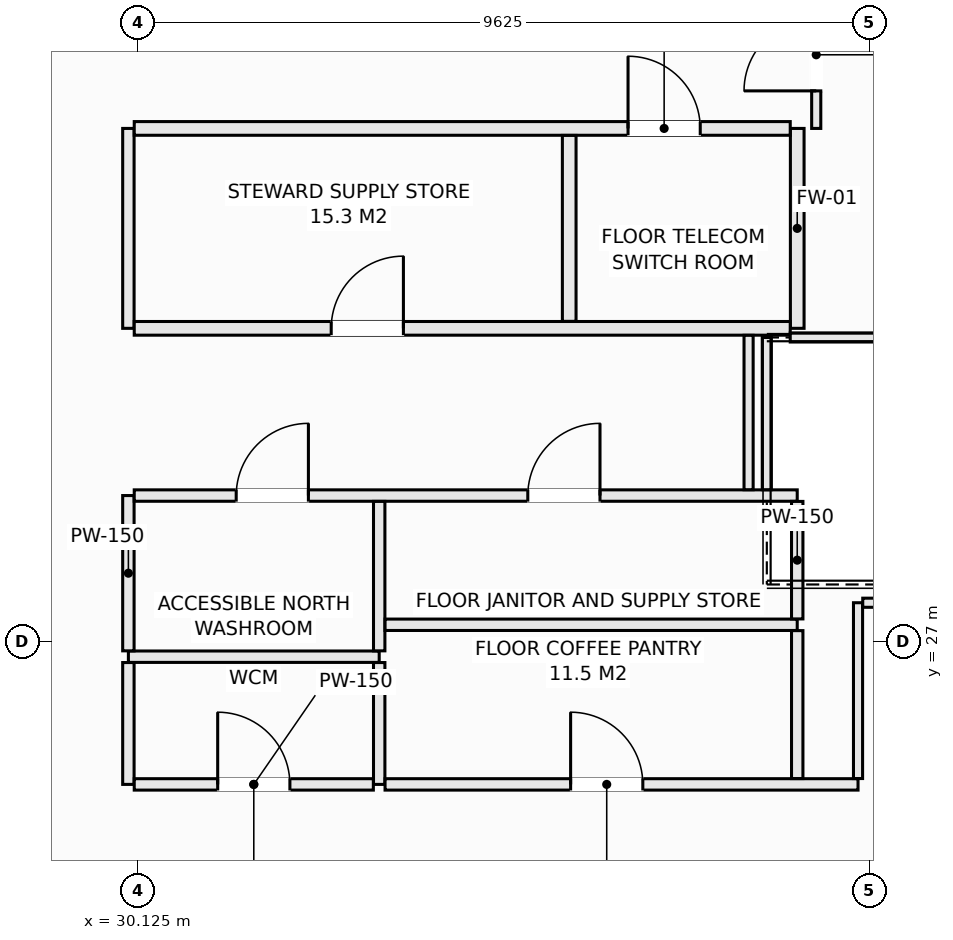
"""IFC4 building model, lengths in metres.
Left out: names, types, materials, properties, quantities, classifications, styles, units other than length and angle.
Written with IfcOpenShell. Run it as: python <this file> out.ifc"""

import sys

from ifc_helpers import new_model, si_unit, direction, frame, frame_2d, origin, place, context, subcontext, project, spatial, rectangle, extrude, element, fill, save


model = new_model("IFC4")
c1 = context("Model", 3, precision=1e-05, world=origin(), true_north=direction((0.0, 1.0)))
c2 = subcontext(c1, "Body", "Model", "MODEL_VIEW")
j1 = project(units=[si_unit("LENGTHUNIT", "METRE"), si_unit("PLANEANGLEUNIT", "RADIAN")], contexts=[c1])
p1 = place(None, origin())
s1 = spatial("IfcSite", under=j1, at=p1, CompositionType="ELEMENT")
p2 = place(p1, origin())
s2 = spatial("IfcBuilding", under=s1, at=p2, CompositionType="ELEMENT")
p3 = place(p2, frame((0.0, 0.0, 206.3)))
s3 = spatial("IfcBuildingStorey", under=s2, at=p3, CompositionType="ELEMENT", Elevation=206.3)
p4 = place(p3, frame((30.0, 26.8, 0.0), z_axis=(0.0, 0.0, 1.0), x_axis=(1.0, 0.0, 0.0)))
e1 = element("IfcWall", 1, at=p4, inside=s3, PredefinedType="PARTITIONING", context=c2, shape_type="SweptSolid", body=[
    extrude(rectangle(XDim=3.3, YDim=0.15, at=frame_2d((1.65, 0.0))), origin(), (0.0, 0.0, 1.0), 3.03),
])
p5 = place(p3, frame((30.0, 25.12, 0.0), z_axis=(0.0, 0.0, 1.0), x_axis=(0.0, 1.0, 0.0)))
e2 = element("IfcWall", 2, at=p5, inside=s3, PredefinedType="PARTITIONING", context=c2, shape_type="SweptSolid", body=[
    extrude(rectangle(XDim=1.603, YDim=0.15, at=frame_2d((0.801, 0.0))), origin(), (0.0, 0.0, 1.0), 3.03),
])
p6 = place(p3, frame((30.0, 26.877, 0.0), z_axis=(0.0, 0.0, 1.0), x_axis=(0.0, 1.0, 0.0)))
e3 = element("IfcWall", 3, at=p6, inside=s3, PredefinedType="PARTITIONING", context=c2, shape_type="SweptSolid", body=[
    extrude(rectangle(XDim=2.043, YDim=0.15, at=frame_2d((1.021, 0.0))), origin(), (0.0, 0.0, 1.0), 3.03),
])
p7 = place(p3, frame((30.0, 31.12, 0.0), z_axis=(0.0, 0.0, 1.0), x_axis=(0.0, 1.0, 0.0)))
e4 = element("IfcWall", 4, at=p7, inside=s3, PredefinedType="PARTITIONING", context=c2, shape_type="SweptSolid", body=[
    extrude(rectangle(XDim=2.63, YDim=0.15, at=frame_2d((1.315, 0.0))), origin(), (0.0, 0.0, 1.0), 3.03),
])
p8 = place(p3, frame((30.077, 28.92, 0.0), z_axis=(0.0, 0.0, 1.0), x_axis=(1.0, 0.0, 0.0)))
e5 = element("IfcWall", 5, at=p8, inside=s3, PredefinedType="PARTITIONING", context=c2, shape_type="SweptSolid", body=[
    extrude(rectangle(XDim=8.723, YDim=0.15, at=frame_2d((4.362, 0.0))), origin(), (0.0, 0.0, 1.0), 3.03),
])
p9 = place(p8, frame((1.342, 0.0, 0.0)))
e6 = element("IfcOpeningElement", 6, at=p9, cuts=e5, PredefinedType="OPENING", context=c2, shape_type="SweptSolid", body=[
    extrude(rectangle(XDim=0.95, YDim=2.1, at=frame_2d((0.475, 1.05))), frame((0.0, 0.085, 0.0), z_axis=(0.0, -1.0, 0.0), x_axis=(1.0, 0.0, 0.0)), (0.0, 0.0, 1.0), 0.17),
])
p10 = place(p8, frame((5.178, 0.0, 0.0)))
e7 = element("IfcOpeningElement", 7, at=p10, cuts=e5, PredefinedType="OPENING", context=c2, shape_type="SweptSolid", body=[
    extrude(rectangle(XDim=0.95, YDim=2.1, at=frame_2d((0.475, 1.05))), frame((0.0, 0.085, 0.0), z_axis=(0.0, -1.0, 0.0), x_axis=(1.0, 0.0, 0.0)), (0.0, 0.0, 1.0), 0.17),
])
p11 = place(p3, frame((33.3, 25.12, 0.0), z_axis=(0.0, 0.0, 1.0), x_axis=(0.0, 1.0, 0.0)))
e8 = element("IfcWall", 8, at=p11, inside=s3, PredefinedType="PARTITIONING", context=c2, shape_type="SweptSolid", body=[
    extrude(rectangle(XDim=1.603, YDim=0.15, at=frame_2d((0.801, 0.0))), origin(), (0.0, 0.0, 1.0), 3.03),
])
p12 = place(p3, frame((33.3, 26.877, 0.0), z_axis=(0.0, 0.0, 1.0), x_axis=(0.0, 1.0, 0.0)))
e9 = element("IfcWall", 9, at=p12, inside=s3, PredefinedType="PARTITIONING", context=c2, shape_type="SweptSolid", body=[
    extrude(rectangle(XDim=1.966, YDim=0.15, at=frame_2d((0.983, 0.0))), origin(), (0.0, 0.0, 1.0), 3.03),
])
p13 = place(p3, frame((30.077, 25.12, 0.0), z_axis=(0.0, 0.0, 1.0), x_axis=(1.0, 0.0, 0.0)))
e10 = element("IfcWall", 10, at=p13, inside=s3, PredefinedType="PARTITIONING", context=c2, shape_type="SweptSolid", body=[
    extrude(rectangle(XDim=3.146, YDim=0.15, at=frame_2d((1.573, 0.0))), origin(), (0.0, 0.0, 1.0), 3.03),
])
p14 = place(p13, frame((1.098, 0.0, 0.0)))
e11 = element("IfcOpeningElement", 11, at=p14, cuts=e10, PredefinedType="OPENING", context=c2, shape_type="SweptSolid", body=[
    extrude(rectangle(XDim=0.95, YDim=2.1, at=frame_2d((0.475, 1.05))), frame((0.0, 0.085, 0.0), z_axis=(0.0, -1.0, 0.0), x_axis=(1.0, 0.0, 0.0)), (0.0, 0.0, 1.0), 0.17),
])
p15 = place(p3, frame((33.377, 25.12, 0.0), z_axis=(0.0, 0.0, 1.0), x_axis=(1.0, 0.0, 0.0)))
e12 = element("IfcWall", 12, at=p15, inside=s3, PredefinedType="PARTITIONING", context=c2, shape_type="SweptSolid", body=[
    extrude(rectangle(XDim=6.223, YDim=0.15, at=frame_2d((3.112, 0.0))), origin(), (0.0, 0.0, 1.0), 3.03),
])
p16 = place(p15, frame((2.441, 0.0, 0.0)))
e13 = element("IfcOpeningElement", 13, at=p16, cuts=e12, PredefinedType="OPENING", context=c2, shape_type="SweptSolid", body=[
    extrude(rectangle(XDim=0.95, YDim=2.1, at=frame_2d((0.475, 1.05))), frame((0.0, 0.085, 0.0), z_axis=(0.0, -1.0, 0.0), x_axis=(1.0, 0.0, 0.0)), (0.0, 0.0, 1.0), 0.17),
])
p17 = place(p3, frame((33.377, 27.22, 0.0), z_axis=(0.0, 0.0, 1.0), x_axis=(1.0, 0.0, 0.0)))
e14 = element("IfcWall", 14, at=p17, inside=s3, PredefinedType="PARTITIONING", context=c2, shape_type="SweptSolid", body=[
    extrude(rectangle(XDim=5.423, YDim=0.15, at=frame_2d((2.711, 0.0))), origin(), (0.0, 0.0, 1.0), 3.03),
])
p18 = place(p3, frame((38.8, 25.197, 0.0), z_axis=(0.0, 0.0, 1.0), x_axis=(0.0, 1.0, 0.0)))
e15 = element("IfcWall", 15, at=p18, inside=s3, PredefinedType="PARTITIONING", context=c2, shape_type="SweptSolid", body=[
    extrude(rectangle(XDim=1.946, YDim=0.15, at=frame_2d((0.973, 0.0))), origin(), (0.0, 0.0, 1.0), 3.03),
])
p19 = place(p3, frame((38.8, 27.297, 0.0), z_axis=(0.0, 0.0, 1.0), x_axis=(0.0, 1.0, 0.0)))
e16 = element("IfcWall", 16, at=p19, inside=s3, PredefinedType="PARTITIONING", context=c2, shape_type="SweptSolid", body=[
    extrude(rectangle(XDim=1.546, YDim=0.15, at=frame_2d((0.773, 0.0))), origin(), (0.0, 0.0, 1.0), 3.03),
])
p20 = place(p3, frame((38.8, 31.12, 0.0), z_axis=(0.0, 0.0, 1.0), x_axis=(0.0, 1.0, 0.0)))
e17 = element("IfcWall", 17, at=p20, inside=s3, PredefinedType="SOLIDWALL", context=c2, shape_type="SweptSolid", body=[
    extrude(rectangle(XDim=2.63, YDim=0.18, at=frame_2d((1.315, 0.0))), origin(), (0.0, 0.0, 1.0), 3.03),
])
p21 = place(p3, frame((30.077, 31.12, 0.0), z_axis=(0.0, 0.0, 1.0), x_axis=(1.0, 0.0, 0.0)))
e18 = element("IfcWall", 18, at=p21, inside=s3, PredefinedType="SOLIDWALL", context=c2, shape_type="SweptSolid", body=[
    extrude(rectangle(XDim=8.631, YDim=0.18, at=frame_2d((4.315, 0.0))), origin(), (0.0, 0.0, 1.0), 3.03),
])
p22 = place(p21, frame((2.592, 0.0, 0.0)))
e19 = element("IfcOpeningElement", 19, at=p22, cuts=e18, PredefinedType="OPENING", context=c2, shape_type="SweptSolid", body=[
    extrude(rectangle(XDim=0.95, YDim=2.1, at=frame_2d((0.475, 1.05))), frame((0.0, 0.1, 0.0), z_axis=(0.0, -1.0, 0.0), x_axis=(1.0, 0.0, 0.0)), (0.0, 0.0, 1.0), 0.2),
])
p23 = place(p3, frame((30.077, 33.75, 0.0), z_axis=(0.0, 0.0, 1.0), x_axis=(1.0, 0.0, 0.0)))
e20 = element("IfcWall", 20, at=p23, inside=s3, PredefinedType="SOLIDWALL", context=c2, shape_type="SweptSolid", body=[
    extrude(rectangle(XDim=8.631, YDim=0.18, at=frame_2d((4.315, 0.0))), origin(), (0.0, 0.0, 1.0), 3.03),
])
p24 = place(p23, frame((6.497, 0.0, 0.0)))
e21 = element("IfcOpeningElement", 21, at=p24, cuts=e20, PredefinedType="OPENING", context=c2, shape_type="SweptSolid", body=[
    extrude(rectangle(XDim=0.95, YDim=2.1, at=frame_2d((0.475, 1.05))), frame((0.0, 0.1, 0.0), z_axis=(0.0, -1.0, 0.0), x_axis=(1.0, 0.0, 0.0)), (0.0, 0.0, 1.0), 0.2),
])
p25 = place(p3, frame((35.8, 31.212, 0.0), z_axis=(0.0, 0.0, 1.0), x_axis=(0.0, 1.0, 0.0)))
e22 = element("IfcWall", 22, at=p25, inside=s3, PredefinedType="SOLIDWALL", context=c2, shape_type="SweptSolid", body=[
    extrude(rectangle(XDim=2.446, YDim=0.18, at=frame_2d((1.223, 0.0))), origin(), (0.0, 0.0, 1.0), 3.03),
])
p26 = place(p3, frame((39.05, 33.75, 0.0), z_axis=(0.0, 0.0, 1.0), x_axis=(0.0, 1.0, 0.0)))
e23 = element("IfcWall", 23, at=p26, inside=s3, PredefinedType="PARTITIONING", context=c2, shape_type="SweptSolid", body=[
    extrude(rectangle(XDim=1.938, YDim=0.12, at=frame_2d((0.969, 0.0))), origin(), (0.0, 0.0, 1.0), 3.03),
])
p27 = place(p26, frame((0.494, 0.0, 0.0)))
e24 = element("IfcOpeningElement", 24, at=p27, cuts=e23, PredefinedType="OPENING", context=c2, shape_type="SweptSolid", body=[
    extrude(rectangle(XDim=0.95, YDim=2.1, at=frame_2d((0.475, 1.05))), frame((0.0, 0.07, 0.0), z_axis=(0.0, -1.0, 0.0), x_axis=(1.0, 0.0, 0.0)), (0.0, 0.0, 1.0), 0.14),
])
p28 = place(p3, frame((38.16, 28.997, 0.0), z_axis=(0.0, 0.0, 1.0), x_axis=(0.0, 1.0, 0.0)))
e25 = element("IfcWall", 25, at=p28, inside=s3, PredefinedType="PARTITIONING", context=c2, shape_type="SweptSolid", body=[
    extrude(rectangle(XDim=2.031, YDim=0.12, at=frame_2d((1.016, 0.0))), origin(), (0.0, 0.0, 1.0), 3.03),
])
p29 = place(p3, frame((39.6, 25.197, 0.0), z_axis=(0.0, 0.0, 1.0), x_axis=(0.0, 1.0, 0.0)))
e26 = element("IfcWall", 26, at=p29, inside=s3, PredefinedType="PARTITIONING", context=c2, shape_type="SweptSolid", body=[
    extrude(rectangle(XDim=2.313, YDim=0.12, at=frame_2d((1.156, 0.0))), origin(), (0.0, 0.0, 1.0), 3.03),
])
p30 = place(p3, frame((39.662, 27.51, 0.0), z_axis=(0.0, 0.0, 1.0), x_axis=(1.0, 0.0, 0.0)))
e27 = element("IfcWall", 27, at=p30, inside=s3, PredefinedType="PARTITIONING", context=c2, shape_type="SweptSolid", body=[
    extrude(rectangle(XDim=1.858, YDim=0.12, at=frame_2d((0.929, 0.0))), origin(), (0.0, 0.0, 1.0), 3.03),
])
p31 = place(p3, frame((38.708, 31.0, 0.0), z_axis=(0.0, 0.0, 1.0), x_axis=(1.0, 0.0, 0.0)))
e28 = element("IfcWall", 28, at=p31, inside=s3, PredefinedType="PARTITIONING", context=c2, shape_type="SweptSolid", body=[
    extrude(rectangle(XDim=5.302, YDim=0.12, at=frame_2d((2.651, 0.0))), origin(), (0.0, 0.0, 1.0), 3.03),
])
p32 = place(p3, frame((38.4, 28.997, 0.0), z_axis=(0.0, 0.0, 1.0), x_axis=(0.0, 1.0, 0.0)))
e29 = element("IfcWall", 29, at=p32, inside=s3, PredefinedType="PARTITIONING", context=c2, shape_type="SweptSolid", body=[
    extrude(rectangle(XDim=2.003, YDim=0.12, at=frame_2d((1.001, 0.0))), origin(), (0.0, 0.0, 1.0), 3.03),
])
p33 = place(p9, origin())
e30 = element("IfcDoor", 30, at=p33, inside=s3, OperationType="SINGLE_SWING_RIGHT", PredefinedType="DOOR", context=c2, shape_type="SweptSolid", body=[
    extrude(rectangle(XDim=0.95, YDim=2.1, at=frame_2d((0.475, 1.05))), frame((0.0, 0.025, 0.0), z_axis=(0.0, -1.0, 0.0), x_axis=(1.0, 0.0, 0.0)), (0.0, 0.0, 1.0), 0.05),
])
fill(e6, e30)
p34 = place(p14, origin())
e31 = element("IfcDoor", 31, at=p34, inside=s3, OperationType="SINGLE_SWING_LEFT", PredefinedType="DOOR", context=c2, shape_type="SweptSolid", body=[
    extrude(rectangle(XDim=0.95, YDim=2.1, at=frame_2d((0.475, 1.05))), frame((0.0, 0.025, 0.0), z_axis=(0.0, -1.0, 0.0), x_axis=(1.0, 0.0, 0.0)), (0.0, 0.0, 1.0), 0.05),
])
fill(e11, e31)
p35 = place(p10, origin())
e32 = element("IfcDoor", 32, at=p35, inside=s3, OperationType="SINGLE_SWING_RIGHT", PredefinedType="DOOR", context=c2, shape_type="SweptSolid", body=[
    extrude(rectangle(XDim=0.95, YDim=2.1, at=frame_2d((0.475, 1.05))), frame((0.0, 0.025, 0.0), z_axis=(0.0, -1.0, 0.0), x_axis=(1.0, 0.0, 0.0)), (0.0, 0.0, 1.0), 0.05),
])
fill(e7, e32)
p36 = place(p16, origin())
e33 = element("IfcDoor", 33, at=p36, inside=s3, OperationType="SINGLE_SWING_LEFT", PredefinedType="DOOR", context=c2, shape_type="SweptSolid", body=[
    extrude(rectangle(XDim=0.95, YDim=2.1, at=frame_2d((0.475, 1.05))), frame((0.0, 0.025, 0.0), z_axis=(0.0, -1.0, 0.0), x_axis=(1.0, 0.0, 0.0)), (0.0, 0.0, 1.0), 0.05),
])
fill(e13, e33)
p37 = place(p22, origin())
e34 = element("IfcDoor", 34, at=p37, inside=s3, OperationType="SINGLE_SWING_RIGHT", PredefinedType="DOOR", context=c2, shape_type="SweptSolid", body=[
    extrude(rectangle(XDim=0.95, YDim=2.1, at=frame_2d((0.475, 1.05))), frame((0.0, 0.025, 0.0), z_axis=(0.0, -1.0, 0.0), x_axis=(1.0, 0.0, 0.0)), (0.0, 0.0, 1.0), 0.05),
])
fill(e19, e34)
p38 = place(p24, origin())
e35 = element("IfcDoor", 35, at=p38, inside=s3, OperationType="SINGLE_SWING_LEFT", PredefinedType="DOOR", context=c2, shape_type="SweptSolid", body=[
    extrude(rectangle(XDim=0.95, YDim=2.1, at=frame_2d((0.475, 1.05))), frame((0.0, 0.025, 0.0), z_axis=(0.0, -1.0, 0.0), x_axis=(1.0, 0.0, 0.0)), (0.0, 0.0, 1.0), 0.05),
])
fill(e21, e35)
p39 = place(p27, origin())
e36 = element("IfcDoor", 36, at=p39, inside=s3, OperationType="SINGLE_SWING_LEFT", PredefinedType="DOOR", context=c2, shape_type="SweptSolid", body=[
    extrude(rectangle(XDim=0.95, YDim=2.1, at=frame_2d((0.475, 1.05))), frame((0.0, 0.025, 0.0), z_axis=(0.0, -1.0, 0.0), x_axis=(1.0, 0.0, 0.0)), (0.0, 0.0, 1.0), 0.05),
])
fill(e24, e36)
save(model, sys.argv[1])
